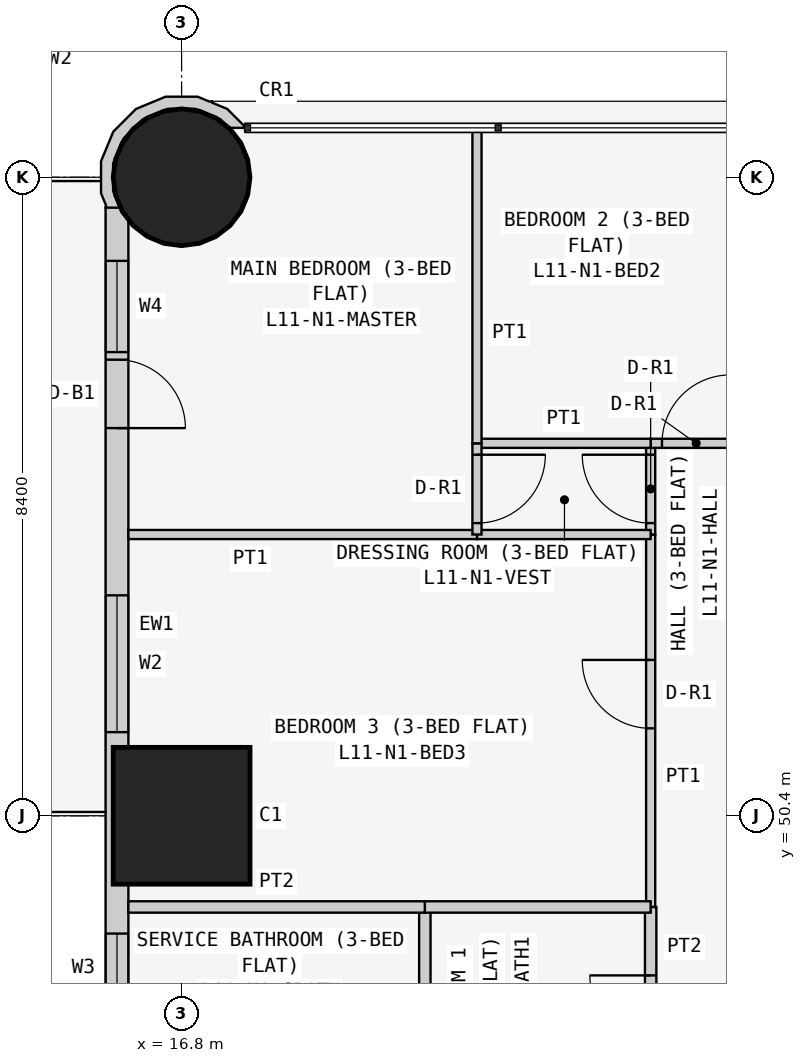
"""IFC4 building model, lengths in metres.
Left out: names, types, materials, properties, quantities, classifications, styles, units other than length and angle.
Written with IfcOpenShell. Run it as: python <this file> out.ifc"""

import sys

from ifc_helpers import new_model, si_unit, direction, frame, frame_2d, origin, origin_2d, place, context, subcontext, project, spatial, polyline, rectangle, circle, outline, extrude, element, fill, save


model = new_model("IFC4")
c1 = context("Model", 3, precision=1e-05, world=origin(), true_north=direction((0.0, 1.0)))
c2 = subcontext(c1, "Body", "Model", "MODEL_VIEW")
j1 = project(units=[si_unit("LENGTHUNIT", "METRE"), si_unit("PLANEANGLEUNIT", "RADIAN")], contexts=[c1])
p1 = place(None, origin())
s1 = spatial("IfcSite", under=j1, at=p1, CompositionType="ELEMENT")
p2 = place(p1, origin())
s2 = spatial("IfcBuilding", under=s1, at=p2, CompositionType="ELEMENT")
p3 = place(p2, frame((0.0, 0.0, 48.9)))
s3 = spatial("IfcBuildingStorey", under=s2, at=p3, CompositionType="ELEMENT", Elevation=48.9)
p4 = place(p3, frame((16.8, 50.4, 0.0), z_axis=(0.0, 0.0, 1.0), x_axis=(1.0, 0.0, 0.0)))
e1 = element("IfcColumn", 1, at=p4, inside=s3, PredefinedType="COLUMN", context=c2, shape_type="SweptSolid", body=[
    extrude(rectangle(XDim=1.8, YDim=1.8, at=origin_2d()), origin(), (0.0, 0.0, 1.0), 3.6),
])
p5 = place(p3, frame((16.8, 58.8, 0.0), z_axis=(0.0, 0.0, 1.0), x_axis=(1.0, 0.0, 0.0)))
e2 = element("IfcColumn", 2, at=p5, inside=s3, PredefinedType="COLUMN", context=c2, shape_type="SweptSolid", body=[
    extrude(circle(Radius=0.9, at=origin_2d()), origin(), (0.0, 0.0, 1.0), 3.6),
])
p6 = place(p3, frame((15.95, 58.4, 0.0), z_axis=(0.0, 0.0, 1.0), x_axis=(0.0, -1.0, 0.0)))
e3 = element("IfcWall", 3, at=p6, inside=s3, PredefinedType="SOLIDWALL", context=c2, shape_type="SweptSolid", body=[
    extrude(rectangle(XDim=15.7, YDim=0.3, at=frame_2d((7.85, 0.0))), origin(), (0.0, 0.0, 1.0), 3.45),
])
p7 = place(p6, frame((12.4, 0.0, 0.9)))
e4 = element("IfcOpeningElement", 4, at=p7, cuts=e3, PredefinedType="OPENING", context=c2, shape_type="SweptSolid", body=[
    extrude(rectangle(XDim=1.8, YDim=1.5, at=frame_2d((0.9, 0.75))), frame((0.0, 0.16, 0.0), z_axis=(0.0, -1.0, 0.0), x_axis=(1.0, 0.0, 0.0)), (0.0, 0.0, 1.0), 0.32),
])
p8 = place(p6, frame((9.55, 0.0, 1.5)))
e5 = element("IfcOpeningElement", 5, at=p8, cuts=e3, PredefinedType="OPENING", context=c2, shape_type="SweptSolid", body=[
    extrude(rectangle(XDim=0.9, YDim=0.7, at=frame_2d((0.45, 0.35))), frame((0.0, 0.16, 0.0), z_axis=(0.0, -1.0, 0.0), x_axis=(1.0, 0.0, 0.0)), (0.0, 0.0, 1.0), 0.32),
])
p9 = place(p6, frame((5.1, 0.0, 0.9)))
e6 = element("IfcOpeningElement", 6, at=p9, cuts=e3, PredefinedType="OPENING", context=c2, shape_type="SweptSolid", body=[
    extrude(rectangle(XDim=1.8, YDim=1.5, at=frame_2d((0.9, 0.75))), frame((0.0, 0.16, 0.0), z_axis=(0.0, -1.0, 0.0), x_axis=(1.0, 0.0, 0.0)), (0.0, 0.0, 1.0), 0.32),
])
p10 = place(p6, frame((2.0, 0.0, 0.0)))
e7 = element("IfcOpeningElement", 7, at=p10, cuts=e3, PredefinedType="OPENING", context=c2, shape_type="SweptSolid", body=[
    extrude(rectangle(XDim=0.9, YDim=2.4, at=frame_2d((0.45, 1.2))), frame((0.0, 0.16, 0.0), z_axis=(0.0, -1.0, 0.0), x_axis=(1.0, 0.0, 0.0)), (0.0, 0.0, 1.0), 0.32),
])
p11 = place(p6, frame((0.7, 0.0, 0.9)))
e8 = element("IfcOpeningElement", 8, at=p11, cuts=e3, PredefinedType="OPENING", context=c2, shape_type="SweptSolid", body=[
    extrude(rectangle(XDim=1.2, YDim=1.5, at=frame_2d((0.6, 0.75))), frame((0.0, 0.16, 0.0), z_axis=(0.0, -1.0, 0.0), x_axis=(1.0, 0.0, 0.0)), (0.0, 0.0, 1.0), 0.32),
])
p12 = place(p3, frame((17.567, 59.411, 0.0), z_axis=(0.0, 0.0, 1.0), x_axis=(-0.377204953059, 0.926129809145, 0.0)))
e9 = element("IfcWall", 9, at=p12, inside=s3, PredefinedType="SOLIDWALL", context=c2, shape_type="SweptSolid", body=[
    extrude(outline(polyline([(-0.27, 2.017), (-0.37, 1.841), (-0.102, 1.842), (0.23, 1.707), (0.484, 1.455), (0.624, 1.125), (0.626, 0.766), (0.491, 0.434), (0.239, 0.18), (0.09, 0.117), (0.011, -0.078), (0.024, -0.083), (0.329, 0.045), (0.48, 0.198), (0.499, 0.193), (0.508, 0.225), (0.626, 0.345), (0.785, 0.736), (0.782, 1.157), (0.619, 1.546), (0.319, 1.842), (-0.072, 2.002), (-0.24, 2.0), (-0.27, 2.017)])), origin(), (0.0, 0.0, 1.0), 3.45),
])
p13 = place(p3, frame((22.971, 49.2, 0.0), z_axis=(0.0, 0.0, 1.0), x_axis=(0.0, -1.0, 0.0)))
e10 = element("IfcWall", 10, at=p13, inside=s3, PredefinedType="PARTITIONING", context=c2, shape_type="SweptSolid", body=[
    extrude(rectangle(XDim=2.6, YDim=0.15, at=frame_2d((1.3, 0.0))), origin(), (0.0, 0.0, 1.0), 3.45),
])
p14 = place(p13, frame((0.9, 0.0, 0.0)))
e11 = element("IfcOpeningElement", 11, at=p14, cuts=e10, PredefinedType="OPENING", context=c2, shape_type="SweptSolid", body=[
    extrude(rectangle(XDim=0.8, YDim=2.1, at=frame_2d((0.4, 1.05))), frame((0.0, 0.085, 0.0), z_axis=(0.0, -1.0, 0.0), x_axis=(1.0, 0.0, 0.0)), (0.0, 0.0, 1.0), 0.17),
])
p15 = place(p3, frame((22.971, 54.1, 0.0), z_axis=(0.0, 0.0, 1.0), x_axis=(0.0, -1.0, 0.0)))
e12 = element("IfcWall", 12, at=p15, inside=s3, PredefinedType="PARTITIONING", context=c2, shape_type="SweptSolid", body=[
    extrude(rectangle(XDim=4.9, YDim=0.12, at=frame_2d((2.45, 0.0))), origin(), (0.0, 0.0, 1.0), 3.45),
])
p16 = place(p15, frame((1.65, 0.0, 0.0)))
e13 = element("IfcOpeningElement", 13, at=p16, cuts=e12, PredefinedType="OPENING", context=c2, shape_type="SweptSolid", body=[
    extrude(rectangle(XDim=0.9, YDim=2.1, at=frame_2d((0.45, 1.05))), frame((0.0, 0.07, 0.0), z_axis=(0.0, -1.0, 0.0), x_axis=(1.0, 0.0, 0.0)), (0.0, 0.0, 1.0), 0.14),
])
p17 = place(p3, frame((22.971, 55.3, 0.0), z_axis=(0.0, 0.0, 1.0), x_axis=(0.0, -1.0, 0.0)))
e14 = element("IfcWall", 14, at=p17, inside=s3, PredefinedType="PARTITIONING", context=c2, shape_type="SweptSolid", body=[
    extrude(rectangle(XDim=1.2, YDim=0.12, at=frame_2d((0.6, 0.0))), origin(), (0.0, 0.0, 1.0), 3.45),
])
p18 = place(p17, frame((0.15, 0.0, 0.0)))
e15 = element("IfcOpeningElement", 15, at=p18, cuts=e14, PredefinedType="OPENING", context=c2, shape_type="SweptSolid", body=[
    extrude(rectangle(XDim=0.9, YDim=2.1, at=frame_2d((0.45, 1.05))), frame((0.0, 0.07, 0.0), z_axis=(0.0, -1.0, 0.0), x_axis=(1.0, 0.0, 0.0)), (0.0, 0.0, 1.0), 0.14),
])
p19 = place(p3, frame((24.171, 55.3, 0.0), z_axis=(0.0, 0.0, 1.0), x_axis=(-1.0, 0.0, 0.0)))
e16 = element("IfcWall", 16, at=p19, inside=s3, PredefinedType="PARTITIONING", context=c2, shape_type="SweptSolid", body=[
    extrude(rectangle(XDim=1.2, YDim=0.12, at=frame_2d((0.6, 0.0))), origin(), (0.0, 0.0, 1.0), 3.45),
])
p20 = place(p19, frame((0.151, 0.0, 0.0)))
e17 = element("IfcOpeningElement", 17, at=p20, cuts=e16, PredefinedType="OPENING", context=c2, shape_type="SweptSolid", body=[
    extrude(rectangle(XDim=0.9, YDim=2.1, at=frame_2d((0.45, 1.05))), frame((0.0, 0.07, 0.0), z_axis=(0.0, -1.0, 0.0), x_axis=(1.0, 0.0, 0.0)), (0.0, 0.0, 1.0), 0.14),
])
p21 = place(p3, frame((20.0, 49.2, 0.0), z_axis=(0.0, 0.0, 1.0), x_axis=(0.0, -1.0, 0.0)))
e18 = element("IfcWall", 18, at=p21, inside=s3, PredefinedType="PARTITIONING", context=c2, shape_type="SweptSolid", body=[
    extrude(rectangle(XDim=2.6, YDim=0.15, at=frame_2d((1.3, 0.0))), origin(), (0.0, 0.0, 1.0), 3.45),
])
p22 = place(p3, frame((22.971, 49.2, 0.0), z_axis=(0.0, 0.0, 1.0), x_axis=(-1.0, 0.0, 0.0)))
e19 = element("IfcWall", 19, at=p22, inside=s3, PredefinedType="PARTITIONING", context=c2, shape_type="SweptSolid", body=[
    extrude(rectangle(XDim=2.971, YDim=0.15, at=frame_2d((1.485, 0.0))), origin(), (0.0, 0.0, 1.0), 3.45),
])
p23 = place(p3, frame((20.0, 49.2, 0.0), z_axis=(0.0, 0.0, 1.0), x_axis=(-1.0, 0.0, 0.0)))
e20 = element("IfcWall", 20, at=p23, inside=s3, PredefinedType="PARTITIONING", context=c2, shape_type="SweptSolid", body=[
    extrude(rectangle(XDim=3.9, YDim=0.15, at=frame_2d((1.95, 0.0))), origin(), (0.0, 0.0, 1.0), 3.45),
])
p24 = place(p3, frame((22.971, 54.1, 0.0), z_axis=(0.0, 0.0, 1.0), x_axis=(-1.0, 0.0, 0.0)))
e21 = element("IfcWall", 21, at=p24, inside=s3, PredefinedType="PARTITIONING", context=c2, shape_type="SweptSolid", body=[
    extrude(rectangle(XDim=2.285, YDim=0.12, at=frame_2d((1.143, 0.0))), origin(), (0.0, 0.0, 1.0), 3.45),
])
p25 = place(p3, frame((20.686, 54.1, 0.0), z_axis=(0.0, 0.0, 1.0), x_axis=(-1.0, 0.0, 0.0)))
e22 = element("IfcWall", 22, at=p25, inside=s3, PredefinedType="PARTITIONING", context=c2, shape_type="SweptSolid", body=[
    extrude(rectangle(XDim=4.586, YDim=0.12, at=frame_2d((2.293, 0.0))), origin(), (0.0, 0.0, 1.0), 3.45),
])
p26 = place(p3, frame((22.971, 55.3, 0.0), z_axis=(0.0, 0.0, 1.0), x_axis=(-1.0, 0.0, 0.0)))
e23 = element("IfcWall", 23, at=p26, inside=s3, PredefinedType="PARTITIONING", context=c2, shape_type="SweptSolid", body=[
    extrude(rectangle(XDim=2.285, YDim=0.12, at=frame_2d((1.143, 0.0))), origin(), (0.0, 0.0, 1.0), 3.45),
])
p27 = place(p3, frame((20.686, 55.3, 0.0), z_axis=(0.0, 0.0, 1.0), x_axis=(0.0, -1.0, 0.0)))
e24 = element("IfcWall", 24, at=p27, inside=s3, PredefinedType="PARTITIONING", context=c2, shape_type="SweptSolid", body=[
    extrude(rectangle(XDim=1.2, YDim=0.12, at=frame_2d((0.6, 0.0))), origin(), (0.0, 0.0, 1.0), 3.45),
])
p28 = place(p27, frame((0.15, 0.0, 0.0)))
e25 = element("IfcOpeningElement", 25, at=p28, cuts=e24, PredefinedType="OPENING", context=c2, shape_type="SweptSolid", body=[
    extrude(rectangle(XDim=0.9, YDim=2.1, at=frame_2d((0.45, 1.05))), frame((0.0, 0.07, 0.0), z_axis=(0.0, -1.0, 0.0), x_axis=(1.0, 0.0, 0.0)), (0.0, 0.0, 1.0), 0.14),
])
p29 = place(p3, frame((20.686, 59.45, 0.0), z_axis=(0.0, 0.0, 1.0), x_axis=(0.0, -1.0, 0.0)))
e26 = element("IfcWall", 26, at=p29, inside=s3, PredefinedType="PARTITIONING", context=c2, shape_type="SweptSolid", body=[
    extrude(rectangle(XDim=4.15, YDim=0.12, at=frame_2d((2.075, 0.0))), origin(), (0.0, 0.0, 1.0), 3.45),
])
p30 = place(p8, origin())
e27 = element("IfcWindow", 27, at=p30, inside=s3, PartitioningType="SINGLE_PANEL", PredefinedType="WINDOW", context=c2, shape_type="SweptSolid", body=[
    extrude(rectangle(XDim=0.9, YDim=0.7, at=frame_2d((0.45, 0.35))), frame((0.0, 0.03, 0.0), z_axis=(0.0, -1.0, 0.0), x_axis=(1.0, 0.0, 0.0)), (0.0, 0.0, 1.0), 0.06),
])
fill(e5, e27)
p31 = place(p9, origin())
e28 = element("IfcWindow", 28, at=p31, inside=s3, PartitioningType="SINGLE_PANEL", PredefinedType="WINDOW", context=c2, shape_type="SweptSolid", body=[
    extrude(rectangle(XDim=1.8, YDim=1.5, at=frame_2d((0.9, 0.75))), frame((0.0, 0.03, 0.0), z_axis=(0.0, -1.0, 0.0), x_axis=(1.0, 0.0, 0.0)), (0.0, 0.0, 1.0), 0.06),
])
fill(e6, e28)
p32 = place(p10, origin())
e29 = element("IfcDoor", 29, at=p32, inside=s3, OperationType="SINGLE_SWING_RIGHT", PredefinedType="DOOR", context=c2, shape_type="SweptSolid", body=[
    extrude(rectangle(XDim=0.9, YDim=2.4, at=frame_2d((0.45, 1.2))), frame((0.0, 0.025, 0.0), z_axis=(0.0, -1.0, 0.0), x_axis=(1.0, 0.0, 0.0)), (0.0, 0.0, 1.0), 0.05),
])
fill(e7, e29)
p33 = place(p11, origin())
e30 = element("IfcWindow", 30, at=p33, inside=s3, PartitioningType="SINGLE_PANEL", PredefinedType="WINDOW", context=c2, shape_type="SweptSolid", body=[
    extrude(rectangle(XDim=1.2, YDim=1.5, at=frame_2d((0.6, 0.75))), frame((0.0, 0.03, 0.0), z_axis=(0.0, -1.0, 0.0), x_axis=(1.0, 0.0, 0.0)), (0.0, 0.0, 1.0), 0.06),
])
fill(e8, e30)
p34 = place(p14, frame((0.8, 0.0, 0.0), z_axis=(0.0, 0.0, 1.0), x_axis=(-1.0, 0.0, 0.0)))
e31 = element("IfcDoor", 31, at=p34, inside=s3, OperationType="SINGLE_SWING_RIGHT", PredefinedType="DOOR", context=c2, shape_type="SweptSolid", body=[
    extrude(rectangle(XDim=0.8, YDim=2.1, at=frame_2d((0.4, 1.05))), frame((0.0, 0.025, 0.0), z_axis=(0.0, -1.0, 0.0), x_axis=(1.0, 0.0, 0.0)), (0.0, 0.0, 1.0), 0.05),
])
fill(e11, e31)
p35 = place(p16, frame((0.9, 0.0, 0.0), z_axis=(0.0, 0.0, 1.0), x_axis=(-1.0, 0.0, 0.0)))
e32 = element("IfcDoor", 32, at=p35, inside=s3, OperationType="SINGLE_SWING_RIGHT", PredefinedType="DOOR", context=c2, shape_type="SweptSolid", body=[
    extrude(rectangle(XDim=0.9, YDim=2.1, at=frame_2d((0.45, 1.05))), frame((0.0, 0.025, 0.0), z_axis=(0.0, -1.0, 0.0), x_axis=(1.0, 0.0, 0.0)), (0.0, 0.0, 1.0), 0.05),
])
fill(e13, e32)
p36 = place(p18, frame((0.9, 0.0, 0.0), z_axis=(0.0, 0.0, 1.0), x_axis=(-1.0, 0.0, 0.0)))
e33 = element("IfcDoor", 33, at=p36, inside=s3, OperationType="SINGLE_SWING_RIGHT", PredefinedType="DOOR", context=c2, shape_type="SweptSolid", body=[
    extrude(rectangle(XDim=0.9, YDim=2.1, at=frame_2d((0.45, 1.05))), frame((0.0, 0.025, 0.0), z_axis=(0.0, -1.0, 0.0), x_axis=(1.0, 0.0, 0.0)), (0.0, 0.0, 1.0), 0.05),
])
fill(e15, e33)
p37 = place(p28, origin())
e34 = element("IfcDoor", 34, at=p37, inside=s3, OperationType="SINGLE_SWING_LEFT", PredefinedType="DOOR", context=c2, shape_type="SweptSolid", body=[
    extrude(rectangle(XDim=0.9, YDim=2.1, at=frame_2d((0.45, 1.05))), frame((0.0, 0.025, 0.0), z_axis=(0.0, -1.0, 0.0), x_axis=(1.0, 0.0, 0.0)), (0.0, 0.0, 1.0), 0.05),
])
fill(e25, e34)
p38 = place(p20, frame((0.9, 0.0, 0.0), z_axis=(0.0, 0.0, 1.0), x_axis=(-1.0, 0.0, 0.0)))
e35 = element("IfcDoor", 35, at=p38, inside=s3, OperationType="SINGLE_SWING_RIGHT", PredefinedType="DOOR", context=c2, shape_type="SweptSolid", body=[
    extrude(rectangle(XDim=0.9, YDim=2.1, at=frame_2d((0.45, 1.05))), frame((0.0, 0.025, 0.0), z_axis=(0.0, -1.0, 0.0), x_axis=(1.0, 0.0, 0.0)), (0.0, 0.0, 1.0), 0.05),
])
fill(e17, e35)
save(model, sys.argv[1])
